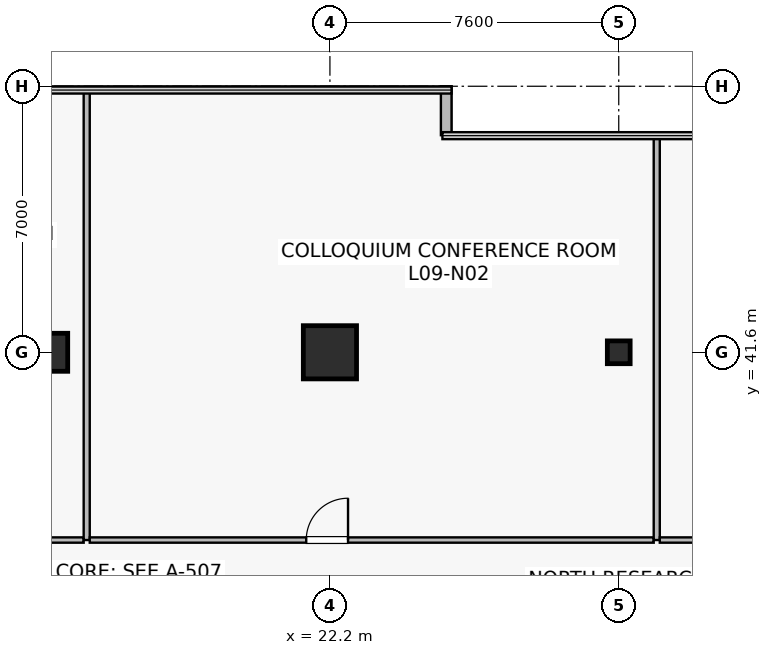
"""IFC4 building model, lengths in metres.
Left out: names, types, materials, properties, quantities, classifications, styles, units other than length and angle.
Written with IfcOpenShell. Run it as: python <this file> out.ifc"""

import sys

from ifc_helpers import new_model, si_unit, direction, frame, frame_2d, origin, origin_2d, place, context, subcontext, project, spatial, rectangle, hollow_rectangle, extrude, source, transform, mapped, element, fill, save


model = new_model("IFC4")
c1 = context("Model", 3, precision=1e-05, world=origin(), true_north=direction((0.0, 1.0)))
c2 = subcontext(c1, "Body", "Model", "MODEL_VIEW")
j1 = project(units=[si_unit("LENGTHUNIT", "METRE"), si_unit("PLANEANGLEUNIT", "RADIAN")], contexts=[c1])
p1 = place(None, origin())
s1 = spatial("IfcSite", under=j1, at=p1, CompositionType="ELEMENT")
p2 = place(p1, origin())
s2 = spatial("IfcBuilding", under=s1, at=p2, CompositionType="ELEMENT")
p3 = place(p2, frame((0.0, 0.0, 37.5)))
s3 = spatial("IfcBuildingStorey", under=s2, at=p3, CompositionType="ELEMENT", Elevation=37.5)
m1 = source(origin(), c2, "Body", "SweptSolid", [
    extrude(rectangle(XDim=1.0, YDim=1.0, at=origin_2d()), origin(), (0.0, 0.0, 1.0), 4.1),
])
p4 = place(p3, frame((14.8, 41.6, 0.0), z_axis=(0.0, 0.0, 1.0), x_axis=(1.0, 0.0, 0.0)))
e1 = element("IfcColumn", 1, at=p4, inside=s3, PredefinedType="COLUMN", context=c2, shape_type="MappedRepresentation", body=[
    mapped(m1, transform((0.0, 0.0, 0.0), scale=1.0)),
])
m2 = source(origin(), c2, "Body", "SweptSolid", [
    extrude(rectangle(XDim=1.4, YDim=1.4, at=origin_2d()), origin(), (0.0, 0.0, 1.0), 4.1),
])
p5 = place(p3, frame((22.2, 41.6, 0.0), z_axis=(0.0, 0.0, 1.0), x_axis=(1.0, 0.0, 0.0)))
e2 = element("IfcColumn", 2, at=p5, inside=s3, PredefinedType="COLUMN", context=c2, shape_type="MappedRepresentation", body=[
    mapped(m2, transform((0.0, 0.0, 0.0), scale=1.0)),
])
m3 = source(origin(), c2, "Body", "SweptSolid", [
    extrude(hollow_rectangle(XDim=0.6, YDim=0.6, WallThickness=0.028, at=origin_2d()), origin(), (0.0, 0.0, 1.0), 4.1),
])
p6 = place(p3, frame((29.8, 41.6, 0.0), z_axis=(0.0, 0.0, 1.0), x_axis=(1.0, 0.0, 0.0)))
e3 = element("IfcColumn", 3, at=p6, inside=s3, PredefinedType="COLUMN", context=c2, shape_type="MappedRepresentation", body=[
    mapped(m3, transform((0.0, 0.0, 0.0), scale=1.0)),
])
p7 = place(p3, frame((25.26, 47.312, 0.0), z_axis=(0.0, 0.0, 1.0), x_axis=(0.0, 1.0, 0.0)))
e4 = element("IfcWall", 4, at=p7, inside=s3, PredefinedType="STANDARD", context=c2, shape_type="SweptSolid", body=[
    extrude(rectangle(XDim=1.288, YDim=0.28, at=frame_2d((0.644, 0.0))), origin(), (0.0, 0.0, 1.0), 3.78),
])
p8 = place(p3, frame((6.98, 36.66, 0.0), z_axis=(0.0, 0.0, 1.0), x_axis=(1.0, 0.0, 0.0)))
e5 = element("IfcWall", 5, at=p8, inside=s3, PredefinedType="PARTITIONING", context=c2, shape_type="SweptSolid", body=[
    extrude(rectangle(XDim=8.74, YDim=0.14, at=frame_2d((4.37, 0.0))), origin(), (0.0, 0.0, 1.0), 3.065),
])
p9 = place(p8, frame((4.028, 0.0, 0.0)))
e6 = element("IfcOpeningElement", 6, at=p9, cuts=e5, PredefinedType="OPENING", context=c2, shape_type="SweptSolid", body=[
    extrude(rectangle(XDim=1.1, YDim=2.18, at=frame_2d((0.55, 1.09))), frame((0.0, 0.08, 0.0), z_axis=(0.0, -1.0, 0.0), x_axis=(1.0, 0.0, 0.0)), (0.0, 0.0, 1.0), 0.16),
])
p10 = place(p3, frame((15.8, 36.66, 0.0), z_axis=(0.0, 0.0, 1.0), x_axis=(0.0, 1.0, 0.0)))
e7 = element("IfcWall", 7, at=p10, inside=s3, PredefinedType="PARTITIONING", context=c2, shape_type="SweptSolid", body=[
    extrude(rectangle(XDim=11.83, YDim=0.16, at=frame_2d((5.915, 0.0))), origin(), (0.0, 0.0, 1.0), 3.015),
])
p11 = place(p3, frame((15.88, 36.66, 0.0), z_axis=(0.0, 0.0, 1.0), x_axis=(1.0, 0.0, 0.0)))
e8 = element("IfcWall", 8, at=p11, inside=s3, PredefinedType="PARTITIONING", context=c2, shape_type="SweptSolid", body=[
    extrude(rectangle(XDim=14.84, YDim=0.14, at=frame_2d((7.42, 0.0))), origin(), (0.0, 0.0, 1.0), 3.065),
])
p12 = place(p11, frame((5.696, 0.0, 0.0)))
e9 = element("IfcOpeningElement", 9, at=p12, cuts=e8, PredefinedType="OPENING", context=c2, shape_type="SweptSolid", body=[
    extrude(rectangle(XDim=1.1, YDim=2.18, at=frame_2d((0.55, 1.09))), frame((0.0, 0.08, 0.0), z_axis=(0.0, -1.0, 0.0), x_axis=(1.0, 0.0, 0.0)), (0.0, 0.0, 1.0), 0.16),
])
p13 = place(p3, frame((30.8, 36.66, 0.0), z_axis=(0.0, 0.0, 1.0), x_axis=(0.0, 1.0, 0.0)))
e10 = element("IfcWall", 10, at=p13, inside=s3, PredefinedType="PARTITIONING", context=c2, shape_type="SweptSolid", body=[
    extrude(rectangle(XDim=10.63, YDim=0.16, at=frame_2d((5.315, 0.0))), origin(), (0.0, 0.0, 1.0), 3.015),
])
p14 = place(p3, frame((30.88, 36.66, 0.0), z_axis=(0.0, 0.0, 1.0), x_axis=(1.0, 0.0, 0.0)))
e11 = element("IfcWall", 11, at=p14, inside=s3, PredefinedType="PARTITIONING", context=c2, shape_type="SweptSolid", body=[
    extrude(rectangle(XDim=16.64, YDim=0.14, at=frame_2d((8.32, 0.0))), origin(), (0.0, 0.0, 1.0), 3.065),
])
p15 = place(p14, frame((8.215, 0.0, 0.0)))
e12 = element("IfcOpeningElement", 12, at=p15, cuts=e11, PredefinedType="OPENING", context=c2, shape_type="SweptSolid", body=[
    extrude(rectangle(XDim=1.1, YDim=2.18, at=frame_2d((0.55, 1.09))), frame((0.0, 0.08, 0.0), z_axis=(0.0, -1.0, 0.0), x_axis=(1.0, 0.0, 0.0)), (0.0, 0.0, 1.0), 0.16),
])
m4 = source(origin(), c2, "Body", "SweptSolid", [
    extrude(rectangle(XDim=1.1, YDim=2.18, at=frame_2d((0.55, 1.09))), frame((0.0, 0.025, 0.0), z_axis=(0.0, -1.0, 0.0), x_axis=(1.0, 0.0, 0.0)), (0.0, 0.0, 1.0), 0.05),
])
p16 = place(p12, origin())
e13 = element("IfcDoor", 13, at=p16, inside=s3, OperationType="SINGLE_SWING_RIGHT", PredefinedType="DOOR", context=c2, shape_type="MappedRepresentation", body=[
    mapped(m4, transform((0.0, 0.0, 0.0), scale=1.0)),
])
fill(e9, e13)
save(model, sys.argv[1])
